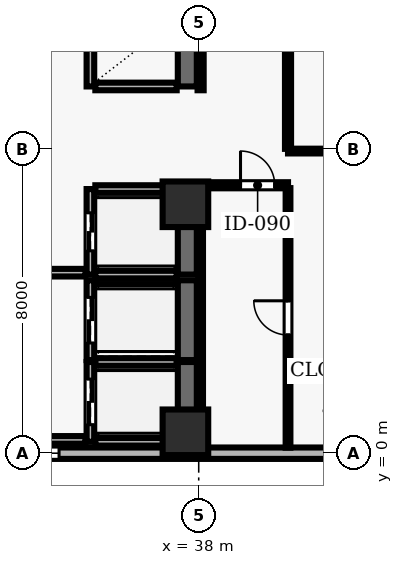
"""IFC4 building model, lengths in metres.
Left out: names, types, materials, properties, quantities, classifications, styles, units other than length and angle.
Written with IfcOpenShell. Run it as: python <this file> out.ifc"""

import sys

from ifc_helpers import new_model, si_unit, direction, frame, frame_2d, origin, origin_2d, place, context, subcontext, project, spatial, rectangle, extrude, element, fill, save


model = new_model("IFC4")
c1 = context("Model", 3, precision=1e-05, world=origin(), true_north=direction((0.0, 1.0)))
c2 = subcontext(c1, "Body", "Model", "MODEL_VIEW")
j1 = project(units=[si_unit("LENGTHUNIT", "METRE"), si_unit("PLANEANGLEUNIT", "RADIAN")], contexts=[c1])
p1 = place(None, origin())
s1 = spatial("IfcSite", under=j1, at=p1, CompositionType="ELEMENT")
p2 = place(p1, origin())
s2 = spatial("IfcBuilding", under=s1, at=p2, CompositionType="ELEMENT")
p3 = place(p2, frame((0.0, 0.0, 154.1)))
s3 = spatial("IfcBuildingStorey", under=s2, at=p3, CompositionType="ELEMENT", Elevation=154.1)
for number, where, z_axis, x_axis in (
    (1, (37.65, 0.55, 0.0), (0.0, 0.0, 1.0), (1.0, 0.0, 0.0)),
    (2, (37.65, 6.55, 0.0), (0.0, 0.0, 1.0), (1.0, 0.0, 0.0)),
):
    element("IfcColumn", number, at=place(p3, frame(where, z_axis=z_axis, x_axis=x_axis)), inside=s3, PredefinedType="COLUMN", context=c2, shape_type="SweptSolid", body=[
        extrude(rectangle(XDim=1.2, YDim=1.2, at=origin_2d()), origin(), (0.0, 0.0, 1.0), 3.9),
    ])
p4 = place(p3, frame((24.5, 0.0, 0.0), z_axis=(0.0, 0.0, 1.0), x_axis=(1.0, 0.0, 0.0)))
e3 = element("IfcWall", 3, at=p4, inside=s3, PredefinedType="SOLIDWALL", context=c2, shape_type="SweptSolid", body=[
    extrude(rectangle(XDim=43.6, YDim=0.3, at=frame_2d((21.8, 0.0))), origin(), (0.0, 0.0, 1.0), 3.69),
])
p5 = place(p4, frame((1.975, 0.0, 0.9)))
e4 = element("IfcOpeningElement", 4, at=p5, cuts=e3, PredefinedType="OPENING", context=c2, shape_type="SweptSolid", body=[
    extrude(rectangle(XDim=1.5, YDim=1.6, at=frame_2d((0.75, 0.8))), frame((0.0, 0.16, 0.0), z_axis=(0.0, -1.0, 0.0), x_axis=(1.0, 0.0, 0.0)), (0.0, 0.0, 1.0), 0.32),
])
p6 = place(p4, frame((8.325, 0.0, 0.9)))
e5 = element("IfcOpeningElement", 5, at=p6, cuts=e3, PredefinedType="OPENING", context=c2, shape_type="SweptSolid", body=[
    extrude(rectangle(XDim=1.5, YDim=1.6, at=frame_2d((0.75, 0.8))), frame((0.0, 0.16, 0.0), z_axis=(0.0, -1.0, 0.0), x_axis=(1.0, 0.0, 0.0)), (0.0, 0.0, 1.0), 0.32),
])
p7 = place(p4, frame((18.325, 0.0, 0.9)))
e6 = element("IfcOpeningElement", 6, at=p7, cuts=e3, PredefinedType="OPENING", context=c2, shape_type="SweptSolid", body=[
    extrude(rectangle(XDim=1.5, YDim=1.6, at=frame_2d((0.75, 0.8))), frame((0.0, 0.16, 0.0), z_axis=(0.0, -1.0, 0.0), x_axis=(1.0, 0.0, 0.0)), (0.0, 0.0, 1.0), 0.32),
])
p8 = place(p4, frame((29.225, 0.0, 0.9)))
e7 = element("IfcOpeningElement", 7, at=p8, cuts=e3, PredefinedType="OPENING", context=c2, shape_type="SweptSolid", body=[
    extrude(rectangle(XDim=1.5, YDim=1.6, at=frame_2d((0.75, 0.8))), frame((0.0, 0.16, 0.0), z_axis=(0.0, -1.0, 0.0), x_axis=(1.0, 0.0, 0.0)), (0.0, 0.0, 1.0), 0.32),
])
p9 = place(p4, frame((40.125, 0.0, 0.9)))
e8 = element("IfcOpeningElement", 8, at=p9, cuts=e3, PredefinedType="OPENING", context=c2, shape_type="SweptSolid", body=[
    extrude(rectangle(XDim=1.5, YDim=1.6, at=frame_2d((0.75, 0.8))), frame((0.0, 0.16, 0.0), z_axis=(0.0, -1.0, 0.0), x_axis=(1.0, 0.0, 0.0)), (0.0, 0.0, 1.0), 0.32),
])
p10 = place(p3, frame((35.15, 2.4, 0.0), z_axis=(0.0, 0.0, 1.0), x_axis=(0.0, -1.0, 0.0)))
e9 = element("IfcWall", 9, at=p10, inside=s3, PredefinedType="SOLIDWALL", context=c2, shape_type="SweptSolid", body=[
    extrude(rectangle(XDim=2.1, YDim=0.2, at=frame_2d((1.05, 0.0))), origin(), (0.0, 0.0, 1.0), 3.69),
])
p11 = place(p10, frame((0.45, 0.0, 0.0)))
e10 = element("IfcOpeningElement", 10, at=p11, cuts=e9, PredefinedType="OPENING", context=c2, shape_type="SweptSolid", body=[
    extrude(rectangle(XDim=1.2, YDim=2.15, at=frame_2d((0.6, 1.075))), frame((0.0, 0.11, 0.0), z_axis=(0.0, -1.0, 0.0), x_axis=(1.0, 0.0, 0.0)), (0.0, 0.0, 1.0), 0.22),
])
p12 = place(p3, frame((37.7, 0.3, 0.0), z_axis=(0.0, 0.0, 1.0), x_axis=(0.0, 1.0, 0.0)))
e11 = element("IfcWall", 11, at=p12, inside=s3, PredefinedType="SHEAR", context=c2, shape_type="SweptSolid", body=[
    extrude(rectangle(XDim=2.1, YDim=0.5, at=frame_2d((1.05, 0.0))), origin(), (0.0, 0.0, 1.0), 3.69),
])
for number, where, z_axis, x_axis in (
    (12, (35.28, 0.3, 0.0), (0.0, 0.0, 1.0), (1.0, 0.0, 0.0)),
    (13, (37.42, 2.4, 0.0), (0.0, 0.0, 1.0), (-1.0, 0.0, 0.0)),
):
    element("IfcWall", number, at=place(p3, frame(where, z_axis=z_axis, x_axis=x_axis)), inside=s3, PredefinedType="SOLIDWALL", context=c2, shape_type="SweptSolid", body=[
        extrude(rectangle(XDim=2.14, YDim=0.2, at=frame_2d((1.07, 0.0))), origin(), (0.0, 0.0, 1.0), 3.69),
    ])
p13 = place(p3, frame((35.15, 4.55, 0.0), z_axis=(0.0, 0.0, 1.0), x_axis=(0.0, -1.0, 0.0)))
e14 = element("IfcWall", 14, at=p13, inside=s3, PredefinedType="SOLIDWALL", context=c2, shape_type="SweptSolid", body=[
    extrude(rectangle(XDim=2.1, YDim=0.2, at=frame_2d((1.05, 0.0))), origin(), (0.0, 0.0, 1.0), 3.69),
])
p14 = place(p13, frame((0.45, 0.0, 0.0)))
e15 = element("IfcOpeningElement", 15, at=p14, cuts=e14, PredefinedType="OPENING", context=c2, shape_type="SweptSolid", body=[
    extrude(rectangle(XDim=1.2, YDim=2.15, at=frame_2d((0.6, 1.075))), frame((0.0, 0.11, 0.0), z_axis=(0.0, -1.0, 0.0), x_axis=(1.0, 0.0, 0.0)), (0.0, 0.0, 1.0), 0.22),
])
p15 = place(p3, frame((37.7, 2.45, 0.0), z_axis=(0.0, 0.0, 1.0), x_axis=(0.0, 1.0, 0.0)))
e16 = element("IfcWall", 16, at=p15, inside=s3, PredefinedType="SHEAR", context=c2, shape_type="SweptSolid", body=[
    extrude(rectangle(XDim=2.1, YDim=0.5, at=frame_2d((1.05, 0.0))), origin(), (0.0, 0.0, 1.0), 3.69),
])
p16 = place(p3, frame((37.42, 4.55, 0.0), z_axis=(0.0, 0.0, 1.0), x_axis=(-1.0, 0.0, 0.0)))
e17 = element("IfcWall", 17, at=p16, inside=s3, PredefinedType="SOLIDWALL", context=c2, shape_type="SweptSolid", body=[
    extrude(rectangle(XDim=2.14, YDim=0.2, at=frame_2d((1.07, 0.0))), origin(), (0.0, 0.0, 1.0), 3.69),
])
p17 = place(p3, frame((35.15, 6.95, 0.0), z_axis=(0.0, 0.0, 1.0), x_axis=(0.0, -1.0, 0.0)))
e18 = element("IfcWall", 18, at=p17, inside=s3, PredefinedType="SOLIDWALL", context=c2, shape_type="SweptSolid", body=[
    extrude(rectangle(XDim=2.25, YDim=0.2, at=frame_2d((1.125, 0.0))), origin(), (0.0, 0.0, 1.0), 3.69),
])
p18 = place(p17, frame((0.625, 0.0, 0.0)))
e19 = element("IfcOpeningElement", 19, at=p18, cuts=e18, PredefinedType="OPENING", context=c2, shape_type="SweptSolid", body=[
    extrude(rectangle(XDim=1.0, YDim=2.1, at=frame_2d((0.5, 1.05))), frame((0.0, 0.11, 0.0), z_axis=(0.0, -1.0, 0.0), x_axis=(1.0, 0.0, 0.0)), (0.0, 0.0, 1.0), 0.22),
])
p19 = place(p3, frame((37.7, 4.7, 0.0), z_axis=(0.0, 0.0, 1.0), x_axis=(0.0, 1.0, 0.0)))
e20 = element("IfcWall", 20, at=p19, inside=s3, PredefinedType="SHEAR", context=c2, shape_type="SweptSolid", body=[
    extrude(rectangle(XDim=2.25, YDim=0.5, at=frame_2d((1.125, 0.0))), origin(), (0.0, 0.0, 1.0), 3.69),
])
for number, where, z_axis, x_axis in (
    (21, (35.28, 4.7, 0.0), (0.0, 0.0, 1.0), (1.0, 0.0, 0.0)),
    (22, (37.42, 6.95, 0.0), (0.0, 0.0, 1.0), (-1.0, 0.0, 0.0)),
):
    element("IfcWall", number, at=place(p3, frame(where, z_axis=z_axis, x_axis=x_axis)), inside=s3, PredefinedType="SOLIDWALL", context=c2, shape_type="SweptSolid", body=[
        extrude(rectangle(XDim=2.14, YDim=0.2, at=frame_2d((1.07, 0.0))), origin(), (0.0, 0.0, 1.0), 3.69),
    ])
p20 = place(p3, frame((35.15, 11.55, 0.0), z_axis=(0.0, 0.0, 1.0), x_axis=(0.0, -1.0, 0.0)))
e23 = element("IfcWall", 23, at=p20, inside=s3, PredefinedType="SOLIDWALL", context=c2, shape_type="SweptSolid", body=[
    extrude(rectangle(XDim=1.9, YDim=0.2, at=frame_2d((0.95, 0.0))), origin(), (0.0, 0.0, 1.0), 3.69),
])
p21 = place(p3, frame((37.7, 9.65, 0.0), z_axis=(0.0, 0.0, 1.0), x_axis=(0.0, 1.0, 0.0)))
e24 = element("IfcWall", 24, at=p21, inside=s3, PredefinedType="SHEAR", context=c2, shape_type="SweptSolid", body=[
    extrude(rectangle(XDim=1.9, YDim=0.5, at=frame_2d((0.95, 0.0))), origin(), (0.0, 0.0, 1.0), 3.69),
])
p22 = place(p3, frame((35.28, 9.65, 0.0), z_axis=(0.0, 0.0, 1.0), x_axis=(1.0, 0.0, 0.0)))
e25 = element("IfcWall", 25, at=p22, inside=s3, PredefinedType="SOLIDWALL", context=c2, shape_type="SweptSolid", body=[
    extrude(rectangle(XDim=2.14, YDim=0.2, at=frame_2d((1.07, 0.0))), origin(), (0.0, 0.0, 1.0), 3.69),
])
p23 = place(p3, frame((31.65, 0.35, 0.0), z_axis=(0.0, 0.0, 1.0), x_axis=(1.0, 0.0, 0.0)))
e26 = element("IfcWall", 26, at=p23, inside=s3, PredefinedType="SOLIDWALL", context=c2, shape_type="SweptSolid", body=[
    extrude(rectangle(XDim=3.37, YDim=0.2, at=frame_2d((1.685, 0.0))), origin(), (0.0, 0.0, 1.0), 3.69),
])
p24 = place(p3, frame((35.02, 4.75, 0.0), z_axis=(0.0, 0.0, 1.0), x_axis=(-1.0, 0.0, 0.0)))
e27 = element("IfcWall", 27, at=p24, inside=s3, PredefinedType="SOLIDWALL", context=c2, shape_type="SweptSolid", body=[
    extrude(rectangle(XDim=3.11, YDim=0.2, at=frame_2d((1.555, 0.0))), origin(), (0.0, 0.0, 1.0), 3.69),
])
p25 = place(p24, frame((1.03, 0.0, 0.0)))
e28 = element("IfcOpeningElement", 28, at=p25, cuts=e27, PredefinedType="OPENING", context=c2, shape_type="SweptSolid", body=[
    extrude(rectangle(XDim=1.05, YDim=2.15, at=frame_2d((0.525, 1.075))), frame((0.0, 0.11, 0.0), z_axis=(0.0, -1.0, 0.0), x_axis=(1.0, 0.0, 0.0)), (0.0, 0.0, 1.0), 0.22),
])
p26 = place(p3, frame((38.05, 7.05, 0.0), z_axis=(0.0, 0.0, 1.0), x_axis=(1.0, 0.0, 0.0)))
e29 = element("IfcWall", 29, at=p26, inside=s3, PredefinedType="PARTITIONING", context=c2, shape_type="SweptSolid", body=[
    extrude(rectangle(XDim=2.3, YDim=0.16, at=frame_2d((1.15, 0.0))), origin(), (0.0, 0.0, 1.0), 3.69),
])
p27 = place(p26, frame((1.05, 0.0, 0.0)))
e30 = element("IfcOpeningElement", 30, at=p27, cuts=e29, PredefinedType="OPENING", context=c2, shape_type="SweptSolid", body=[
    extrude(rectangle(XDim=0.9, YDim=2.1, at=frame_2d((0.45, 1.05))), frame((0.0, 0.09, 0.0), z_axis=(0.0, -1.0, 0.0), x_axis=(1.0, 0.0, 0.0)), (0.0, 0.0, 1.0), 0.18),
])
p28 = place(p3, frame((49.42, 7.95, 0.0), z_axis=(0.0, 0.0, 1.0), x_axis=(-1.0, 0.0, 0.0)))
e31 = element("IfcWall", 31, at=p28, inside=s3, PredefinedType="PARTITIONING", context=c2, shape_type="SweptSolid", body=[
    extrude(rectangle(XDim=9.07, YDim=0.125, at=frame_2d((4.535, 0.0))), origin(), (0.0, 0.0, 1.0), 3.073),
])
p29 = place(p3, frame((38.05, 6.975, 0.0), z_axis=(0.0, 0.0, 1.0), x_axis=(0.0, -1.0, 0.0)))
e32 = element("IfcWall", 32, at=p29, inside=s3, PredefinedType="PARTITIONING", context=c2, shape_type="SweptSolid", body=[
    extrude(rectangle(XDim=6.83, YDim=0.125, at=frame_2d((3.415, 0.0))), origin(), (0.0, 0.0, 1.0), 3.073),
])
p30 = place(p3, frame((38.05, 15.925, 0.0), z_axis=(0.0, 0.0, 1.0), x_axis=(0.0, -1.0, 0.0)))
e33 = element("IfcWall", 33, at=p30, inside=s3, PredefinedType="PARTITIONING", context=c2, shape_type="SweptSolid", body=[
    extrude(rectangle(XDim=6.375, YDim=0.16, at=frame_2d((3.188, 0.0))), origin(), (0.0, 0.0, 1.0), 3.073),
])
p31 = place(p3, frame((40.35, 0.145, 0.0), z_axis=(0.0, 0.0, 1.0), x_axis=(0.0, 1.0, 0.0)))
e34 = element("IfcWall", 34, at=p31, inside=s3, PredefinedType="PARTITIONING", context=c2, shape_type="SweptSolid", body=[
    extrude(rectangle(XDim=6.83, YDim=0.125, at=frame_2d((3.415, 0.0))), origin(), (0.0, 0.0, 1.0), 3.69),
])
p32 = place(p31, frame((2.965, 0.0, 0.0)))
e35 = element("IfcOpeningElement", 35, at=p32, cuts=e34, PredefinedType="OPENING", context=c2, shape_type="SweptSolid", body=[
    extrude(rectangle(XDim=0.9, YDim=2.1, at=frame_2d((0.45, 1.05))), frame((0.0, 0.073, 0.0), z_axis=(0.0, -1.0, 0.0), x_axis=(1.0, 0.0, 0.0)), (0.0, 0.0, 1.0), 0.145),
])
p33 = place(p3, frame((40.35, 8.008, 0.0), z_axis=(0.0, 0.0, 1.0), x_axis=(0.0, 1.0, 0.0)))
e36 = element("IfcWall", 36, at=p33, inside=s3, PredefinedType="PARTITIONING", context=c2, shape_type="SweptSolid", body=[
    extrude(rectangle(XDim=5.567, YDim=0.16, at=frame_2d((2.783, 0.0))), origin(), (0.0, 0.0, 1.0), 3.69),
])
p34 = place(p6, origin())
e37 = element("IfcWindow", 37, at=p34, inside=s3, PartitioningType="SINGLE_PANEL", PredefinedType="WINDOW", context=c2, shape_type="SweptSolid", body=[
    extrude(rectangle(XDim=1.5, YDim=1.6, at=frame_2d((0.75, 0.8))), frame((0.0, 0.03, 0.0), z_axis=(0.0, -1.0, 0.0), x_axis=(1.0, 0.0, 0.0)), (0.0, 0.0, 1.0), 0.06),
])
fill(e5, e37)
p35 = place(p11, origin())
e38 = element("IfcDoor", 38, at=p35, inside=s3, OperationType="DOUBLE_DOOR_SLIDING", PredefinedType="DOOR", context=c2, shape_type="SweptSolid", body=[
    extrude(rectangle(XDim=1.2, YDim=2.15, at=frame_2d((0.6, 1.075))), frame((0.0, 0.025, 0.0), z_axis=(0.0, -1.0, 0.0), x_axis=(1.0, 0.0, 0.0)), (0.0, 0.0, 1.0), 0.05),
])
fill(e10, e38)
p36 = place(p14, origin())
e39 = element("IfcDoor", 39, at=p36, inside=s3, OperationType="DOUBLE_DOOR_SLIDING", PredefinedType="DOOR", context=c2, shape_type="SweptSolid", body=[
    extrude(rectangle(XDim=1.2, YDim=2.15, at=frame_2d((0.6, 1.075))), frame((0.0, 0.025, 0.0), z_axis=(0.0, -1.0, 0.0), x_axis=(1.0, 0.0, 0.0)), (0.0, 0.0, 1.0), 0.05),
])
fill(e15, e39)
p37 = place(p18, origin())
e40 = element("IfcDoor", 40, at=p37, inside=s3, OperationType="DOUBLE_DOOR_SLIDING", PredefinedType="DOOR", context=c2, shape_type="SweptSolid", body=[
    extrude(rectangle(XDim=1.0, YDim=2.1, at=frame_2d((0.5, 1.05))), frame((0.0, 0.025, 0.0), z_axis=(0.0, -1.0, 0.0), x_axis=(1.0, 0.0, 0.0)), (0.0, 0.0, 1.0), 0.05),
])
fill(e19, e40)
p38 = place(p27, origin())
e41 = element("IfcDoor", 41, at=p38, inside=s3, OperationType="SINGLE_SWING_LEFT", PredefinedType="DOOR", context=c2, shape_type="SweptSolid", body=[
    extrude(rectangle(XDim=0.9, YDim=2.1, at=frame_2d((0.45, 1.05))), frame((0.0, 0.025, 0.0), z_axis=(0.0, -1.0, 0.0), x_axis=(1.0, 0.0, 0.0)), (0.0, 0.0, 1.0), 0.05),
])
fill(e30, e41)
p39 = place(p32, origin())
e42 = element("IfcDoor", 42, at=p39, inside=s3, OperationType="SINGLE_SWING_RIGHT", PredefinedType="DOOR", context=c2, shape_type="SweptSolid", body=[
    extrude(rectangle(XDim=0.9, YDim=2.1, at=frame_2d((0.45, 1.05))), frame((0.0, 0.025, 0.0), z_axis=(0.0, -1.0, 0.0), x_axis=(1.0, 0.0, 0.0)), (0.0, 0.0, 1.0), 0.05),
])
fill(e35, e42)
save(model, sys.argv[1])
